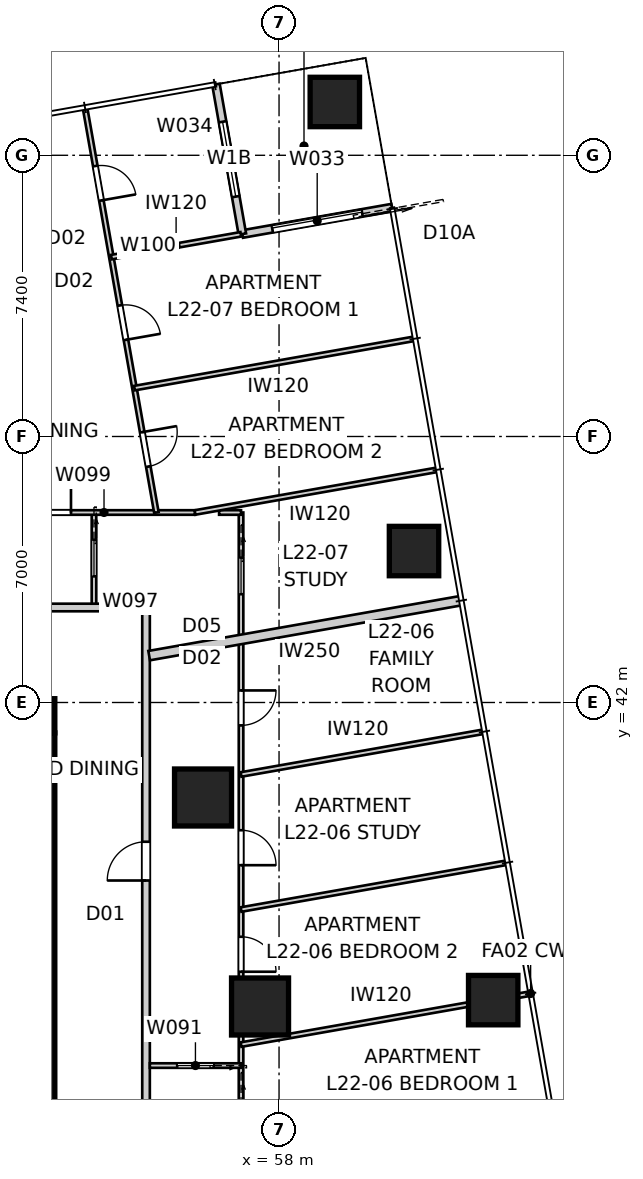
"""IFC4 building model, lengths in metres.
Left out: names, types, materials, properties, quantities, classifications, styles, units other than length and angle.
Written with IfcOpenShell. Run it as: python <this file> out.ifc"""

import sys

from ifc_helpers import new_model, si_unit, direction, frame, frame_2d, origin, origin_2d, place, context, subcontext, project, spatial, polyline, rectangle, outline, extrude, element, fill, save


model = new_model("IFC4")
c1 = context("Model", 3, precision=1e-05, world=origin(), true_north=direction((0.0, 1.0)))
c2 = subcontext(c1, "Body", "Model", "MODEL_VIEW")
j1 = project(units=[si_unit("LENGTHUNIT", "METRE"), si_unit("PLANEANGLEUNIT", "RADIAN")], contexts=[c1])
p1 = place(None, origin())
s1 = spatial("IfcSite", under=j1, at=p1, CompositionType="ELEMENT")
p2 = place(p1, origin())
s2 = spatial("IfcBuilding", under=s1, at=p2, CompositionType="ELEMENT")
p3 = place(p2, frame((0.0, 0.0, 82.8)))
s3 = spatial("IfcBuildingStorey", under=s2, at=p3, CompositionType="ELEMENT", Elevation=82.8)
p4 = place(p3, frame((51.65, 18.8, 0.0), z_axis=(0.0, 0.0, 1.0), x_axis=(0.0, 1.0, 0.0)))
e1 = element("IfcWall", 1, at=p4, inside=s3, PredefinedType="SHEAR", context=c2, shape_type="SweptSolid", body=[
    extrude(outline(polyline([(0.0, -0.45), (22.4, -0.45), (22.4, -0.025), (22.85, -0.025), (22.85, 0.025), (22.4, 0.025), (22.4, 0.45), (0.0, 0.45), (0.0, 0.025), (-0.45, 0.025), (-0.45, -0.025), (0.0, -0.025), (0.0, -0.45)])), origin(), (0.0, 0.0, 1.0), 3.4),
])
p5 = place(p4, frame((11.14, 0.0, 0.0)))
e2 = element("IfcOpeningElement", 2, at=p5, cuts=e1, PredefinedType="OPENING", context=c2, shape_type="SweptSolid", body=[
    extrude(rectangle(XDim=1.02, YDim=2.4, at=frame_2d((0.51, 1.2))), frame((0.0, 0.46, 0.0), z_axis=(0.0, -1.0, 0.0), x_axis=(1.0, 0.0, 0.0)), (0.0, 0.0, 1.0), 0.92),
])
p6 = place(p3, frame((51.65, 41.65, 0.0), z_axis=(0.0, 0.0, 1.0), x_axis=(1.0, 0.0, 0.0)))
e3 = element("IfcColumn", 3, at=p6, inside=s3, PredefinedType="COLUMN", context=c2, shape_type="SweptSolid", body=[
    extrude(rectangle(XDim=0.9, YDim=0.9, at=origin_2d()), origin(), (0.0, 0.0, 1.0), 3.4),
])
for number, where, z_axis, x_axis in (
    (4, (63.635, 34.167, 0.0), (0.0, 0.0, 1.0), (1.0, 0.0, 0.0)),
    (5, (61.552, 45.985, 0.0), (0.0, 0.0, 1.0), (1.0, 0.0, 0.0)),
    (6, (59.468, 57.803, 0.0), (0.0, 0.0, 1.0), (1.0, 0.0, 0.0)),
):
    element("IfcColumn", number, at=place(p3, frame(where, z_axis=z_axis, x_axis=x_axis)), inside=s3, PredefinedType="COLUMN", context=c2, shape_type="SweptSolid", body=[
        extrude(rectangle(XDim=1.3, YDim=1.3, at=origin_2d()), origin(), (0.0, 0.0, 1.0), 3.4),
    ])
for number, where, z_axis, x_axis in (
    (7, (57.5, 34.0, 0.0), (0.0, 0.0, 1.0), (1.0, 0.0, 0.0)),
    (8, (56.0, 39.5, 0.0), (0.0, 0.0, 1.0), (1.0, 0.0, 0.0)),
):
    element("IfcColumn", number, at=place(p3, frame(where, z_axis=z_axis, x_axis=x_axis)), inside=s3, PredefinedType="COLUMN", context=c2, shape_type="SweptSolid", body=[
        extrude(rectangle(XDim=1.5, YDim=1.5, at=origin_2d()), origin(), (0.0, 0.0, 1.0), 3.4),
    ])
p7 = place(p3, frame((60.974, 55.022, 0.0), z_axis=(0.0, 0.0, 1.0), x_axis=(-0.984808127031, -0.173646056486, 0.0)))
e9 = element("IfcWall", 9, at=p7, inside=s3, PredefinedType="SOLIDWALL", context=c2, shape_type="SweptSolid", body=[
    extrude(rectangle(XDim=4.0, YDim=0.2, at=frame_2d((2.0, 0.0))), origin(), (0.0, 0.0, 1.0), 3.25),
])
p8 = place(p7, frame((0.8, 0.0, 0.0)))
e10 = element("IfcOpeningElement", 10, at=p8, cuts=e9, PredefinedType="OPENING", context=c2, shape_type="SweptSolid", body=[
    extrude(rectangle(XDim=2.4, YDim=2.1, at=frame_2d((1.2, 1.05))), frame((0.0, 0.11, 0.0), z_axis=(0.0, -1.0, 0.0), x_axis=(1.0, 0.0, 0.0)), (0.0, 0.0, 1.0), 0.22),
])
p9 = place(p3, frame((57.034, 54.328, 0.0), z_axis=(0.0, 0.0, 1.0), x_axis=(-0.173646056486, 0.984808127031, 0.0)))
e11 = element("IfcWall", 11, at=p9, inside=s3, PredefinedType="SOLIDWALL", context=c2, shape_type="SweptSolid", body=[
    extrude(rectangle(XDim=4.0, YDim=0.2, at=frame_2d((2.0, 0.0))), origin(), (0.0, 0.0, 1.0), 3.25),
])
p10 = place(p9, frame((1.0, 0.0, 0.45)))
e12 = element("IfcOpeningElement", 12, at=p10, cuts=e11, PredefinedType="OPENING", context=c2, shape_type="SweptSolid", body=[
    extrude(rectangle(XDim=2.0, YDim=1.8, at=frame_2d((1.0, 0.9))), frame((0.0, 0.11, 0.0), z_axis=(0.0, -1.0, 0.0), x_axis=(1.0, 0.0, 0.0)), (0.0, 0.0, 1.0), 0.22),
])
p11 = place(p3, frame((54.5, 15.5, 0.0), z_axis=(0.0, 0.0, 1.0), x_axis=(0.0, 1.0, 0.0)))
e13 = element("IfcWall", 13, at=p11, inside=s3, PredefinedType="PARTITIONING", context=c2, shape_type="SweptSolid", body=[
    extrude(rectangle(XDim=29.0, YDim=0.2, at=frame_2d((14.5, 0.0))), origin(), (0.0, 0.0, 1.0), 3.25),
])
p12 = place(p11, frame((21.815, 0.0, 0.0)))
e14 = element("IfcOpeningElement", 14, at=p12, cuts=e13, PredefinedType="OPENING", context=c2, shape_type="SweptSolid", body=[
    extrude(rectangle(XDim=1.02, YDim=2.34, at=frame_2d((0.51, 1.17))), frame((0.0, 0.11, 0.0), z_axis=(0.0, -1.0, 0.0), x_axis=(1.0, 0.0, 0.0)), (0.0, 0.0, 1.0), 0.22),
])
p13 = place(p11, frame((2.855, 0.0, 0.0)))
e15 = element("IfcOpeningElement", 15, at=p13, cuts=e13, PredefinedType="OPENING", context=c2, shape_type="SweptSolid", body=[
    extrude(rectangle(XDim=1.02, YDim=2.1, at=frame_2d((0.51, 1.05))), frame((0.0, 0.11, 0.0), z_axis=(0.0, -1.0, 0.0), x_axis=(1.0, 0.0, 0.0)), (0.0, 0.0, 1.0), 0.22),
])
p14 = place(p3, frame((54.5, 44.5, 0.0), z_axis=(0.0, 0.0, 1.0), x_axis=(-1.0, 0.0, 0.0)))
e16 = element("IfcWall", 16, at=p14, inside=s3, PredefinedType="PARTITIONING", context=c2, shape_type="SweptSolid", body=[
    extrude(rectangle(XDim=29.0, YDim=0.2, at=frame_2d((14.5, 0.0))), origin(), (0.0, 0.0, 1.0), 3.25),
])
p15 = place(p14, frame((10.129, 0.0, 0.0)))
e17 = element("IfcOpeningElement", 17, at=p15, cuts=e16, PredefinedType="OPENING", context=c2, shape_type="SweptSolid", body=[
    extrude(rectangle(XDim=1.02, YDim=2.34, at=frame_2d((0.51, 1.17))), frame((0.0, 0.11, 0.0), z_axis=(0.0, -1.0, 0.0), x_axis=(1.0, 0.0, 0.0)), (0.0, 0.0, 1.0), 0.22),
])
p16 = place(p14, frame((3.065, 0.0, 0.0)))
e18 = element("IfcOpeningElement", 18, at=p16, cuts=e16, PredefinedType="OPENING", context=c2, shape_type="SweptSolid", body=[
    extrude(rectangle(XDim=1.02, YDim=2.1, at=frame_2d((0.51, 1.05))), frame((0.0, 0.11, 0.0), z_axis=(0.0, -1.0, 0.0), x_axis=(1.0, 0.0, 0.0)), (0.0, 0.0, 1.0), 0.22),
])
p17 = place(p3, frame((62.797, 44.682, 0.0), z_axis=(0.0, 0.0, 1.0), x_axis=(-0.984807121942, -0.173651756605, 0.0)))
e19 = element("IfcWall", 19, at=p17, inside=s3, PredefinedType="PARTITIONING", context=c2, shape_type="SweptSolid", body=[
    extrude(rectangle(XDim=8.341, YDim=0.25, at=frame_2d((4.171, 0.0))), origin(), (0.0, 0.0, 1.0), 3.25),
])
p18 = place(p3, frame((57.0, 47.0, 0.0), z_axis=(0.0, 0.0, 1.0), x_axis=(0.0, -1.0, 0.0)))
e20 = element("IfcWall", 20, at=p18, inside=s3, PredefinedType="PARTITIONING", context=c2, shape_type="SweptSolid", body=[
    extrude(rectangle(XDim=34.0, YDim=0.12, at=frame_2d((17.0, 0.0))), origin(), (0.0, 0.0, 1.0), 2.55),
])
p19 = place(p18, frame((8.361, 0.0, 0.0)))
e21 = element("IfcOpeningElement", 21, at=p19, cuts=e20, PredefinedType="OPENING", context=c2, shape_type="SweptSolid", body=[
    extrude(rectangle(XDim=0.92, YDim=2.34, at=frame_2d((0.46, 1.17))), frame((0.0, 0.07, 0.0), z_axis=(0.0, -1.0, 0.0), x_axis=(1.0, 0.0, 0.0)), (0.0, 0.0, 1.0), 0.14),
])
p20 = place(p18, frame((11.166, 0.0, 0.0)))
e22 = element("IfcOpeningElement", 22, at=p20, cuts=e20, PredefinedType="OPENING", context=c2, shape_type="SweptSolid", body=[
    extrude(rectangle(XDim=0.92, YDim=2.34, at=frame_2d((0.46, 1.17))), frame((0.0, 0.07, 0.0), z_axis=(0.0, -1.0, 0.0), x_axis=(1.0, 0.0, 0.0)), (0.0, 0.0, 1.0), 0.14),
])
p21 = place(p18, frame((4.683, 0.0, 0.0)))
e23 = element("IfcOpeningElement", 23, at=p21, cuts=e20, PredefinedType="OPENING", context=c2, shape_type="SweptSolid", body=[
    extrude(rectangle(XDim=0.92, YDim=2.34, at=frame_2d((0.46, 1.17))), frame((0.0, 0.07, 0.0), z_axis=(0.0, -1.0, 0.0), x_axis=(1.0, 0.0, 0.0)), (0.0, 0.0, 1.0), 0.14),
])
p22 = place(p18, frame((27.784, 0.0, 0.0)))
e24 = element("IfcOpeningElement", 24, at=p22, cuts=e20, PredefinedType="OPENING", context=c2, shape_type="SweptSolid", body=[
    extrude(rectangle(XDim=0.92, YDim=2.34, at=frame_2d((0.46, 1.17))), frame((0.0, 0.07, 0.0), z_axis=(0.0, -1.0, 0.0), x_axis=(1.0, 0.0, 0.0)), (0.0, 0.0, 1.0), 0.14),
])
p23 = place(p18, frame((31.939, 0.0, 0.0)))
e25 = element("IfcOpeningElement", 25, at=p23, cuts=e20, PredefinedType="OPENING", context=c2, shape_type="SweptSolid", body=[
    extrude(rectangle(XDim=0.92, YDim=2.34, at=frame_2d((0.46, 1.17))), frame((0.0, 0.07, 0.0), z_axis=(0.0, -1.0, 0.0), x_axis=(1.0, 0.0, 0.0)), (0.0, 0.0, 1.0), 0.14),
])
p24 = place(p18, frame((15.601, 0.0, 0.0)))
e26 = element("IfcOpeningElement", 26, at=p24, cuts=e20, PredefinedType="OPENING", context=c2, shape_type="SweptSolid", body=[
    extrude(rectangle(XDim=0.96, YDim=2.1, at=frame_2d((0.48, 1.05))), frame((0.0, 0.07, 0.0), z_axis=(0.0, -1.0, 0.0), x_axis=(1.0, 0.0, 0.0)), (0.0, 0.0, 1.0), 0.14),
])
p25 = place(p18, frame((18.21, 0.0, 0.0)))
e27 = element("IfcOpeningElement", 27, at=p25, cuts=e20, PredefinedType="OPENING", context=c2, shape_type="SweptSolid", body=[
    extrude(rectangle(XDim=0.96, YDim=2.1, at=frame_2d((0.48, 1.05))), frame((0.0, 0.07, 0.0), z_axis=(0.0, -1.0, 0.0), x_axis=(1.0, 0.0, 0.0)), (0.0, 0.0, 1.0), 0.14),
])
p26 = place(p18, frame((1.19, 0.0, 0.0)))
e28 = element("IfcOpeningElement", 28, at=p26, cuts=e20, PredefinedType="OPENING", context=c2, shape_type="SweptSolid", body=[
    extrude(rectangle(XDim=0.96, YDim=2.1, at=frame_2d((0.48, 1.05))), frame((0.0, 0.07, 0.0), z_axis=(0.0, -1.0, 0.0), x_axis=(1.0, 0.0, 0.0)), (0.0, 0.0, 1.0), 0.14),
])
p27 = place(p3, frame((57.0, 32.446, 0.0), z_axis=(0.0, 0.0, 1.0), x_axis=(-1.0, 0.0, 0.0)))
e29 = element("IfcWall", 29, at=p27, inside=s3, PredefinedType="PARTITIONING", context=c2, shape_type="SweptSolid", body=[
    extrude(rectangle(XDim=2.4, YDim=0.12, at=frame_2d((1.2, 0.0))), origin(), (0.0, 0.0, 1.0), 3.25),
])
p28 = place(p27, frame((0.72, 0.0, 0.0)))
e30 = element("IfcOpeningElement", 30, at=p28, cuts=e29, PredefinedType="OPENING", context=c2, shape_type="SweptSolid", body=[
    extrude(rectangle(XDim=0.96, YDim=2.1, at=frame_2d((0.48, 1.05))), frame((0.0, 0.07, 0.0), z_axis=(0.0, -1.0, 0.0), x_axis=(1.0, 0.0, 0.0)), (0.0, 0.0, 1.0), 0.14),
])
p29 = place(p3, frame((57.0, 32.998, 0.0), z_axis=(0.0, 0.0, 1.0), x_axis=(0.984808453088, 0.173644207293, 0.0)))
e31 = element("IfcWall", 31, at=p29, inside=s3, PredefinedType="PARTITIONING", context=c2, shape_type="SweptSolid", body=[
    extrude(rectangle(XDim=7.698, YDim=0.12, at=frame_2d((3.849, 0.0))), origin(), (0.0, 0.0, 1.0), 3.25),
])
p30 = place(p3, frame((57.0, 36.552, 0.0), z_axis=(0.0, 0.0, 1.0), x_axis=(0.984809234282, 0.173639776761, 0.0)))
e32 = element("IfcWall", 32, at=p30, inside=s3, PredefinedType="PARTITIONING", context=c2, shape_type="SweptSolid", body=[
    extrude(rectangle(XDim=7.081, YDim=0.12, at=frame_2d((3.541, 0.0))), origin(), (0.0, 0.0, 1.0), 3.25),
])
p31 = place(p3, frame((57.0, 40.105, 0.0), z_axis=(0.0, 0.0, 1.0), x_axis=(0.984809025774, 0.173640959323, 0.0)))
e33 = element("IfcWall", 33, at=p31, inside=s3, PredefinedType="PARTITIONING", context=c2, shape_type="SweptSolid", body=[
    extrude(rectangle(XDim=6.463, YDim=0.12, at=frame_2d((3.232, 0.0))), origin(), (0.0, 0.0, 1.0), 3.25),
])
p32 = place(p3, frame((53.13, 47.0, 0.0), z_axis=(0.0, 0.0, 1.0), x_axis=(0.0, -1.0, 0.0)))
e34 = element("IfcWall", 34, at=p32, inside=s3, PredefinedType="PARTITIONING", context=c2, shape_type="SweptSolid", body=[
    extrude(rectangle(XDim=2.4, YDim=0.12, at=frame_2d((1.2, 0.0))), origin(), (0.0, 0.0, 1.0), 3.25),
])
p33 = place(p32, frame((0.72, 0.0, 0.0)))
e35 = element("IfcOpeningElement", 35, at=p33, cuts=e34, PredefinedType="OPENING", context=c2, shape_type="SweptSolid", body=[
    extrude(rectangle(XDim=0.96, YDim=2.1, at=frame_2d((0.48, 1.05))), frame((0.0, 0.07, 0.0), z_axis=(0.0, -1.0, 0.0), x_axis=(1.0, 0.0, 0.0)), (0.0, 0.0, 1.0), 0.14),
])
p34 = place(p3, frame((51.0, 47.0, 0.0), z_axis=(0.0, 0.0, 1.0), x_axis=(1.0, 0.0, 0.0)))
e36 = element("IfcWall", 36, at=p34, inside=s3, PredefinedType="PARTITIONING", context=c2, shape_type="SweptSolid", body=[
    extrude(rectangle(XDim=4.789, YDim=0.12, at=frame_2d((2.395, 0.0))), origin(), (0.0, 0.0, 1.0), 2.638),
])
p35 = place(p34, frame((0.605, 0.0, 0.0)))
e37 = element("IfcOpeningElement", 37, at=p35, cuts=e36, PredefinedType="OPENING", context=c2, shape_type="SweptSolid", body=[
    extrude(rectangle(XDim=0.92, YDim=2.34, at=frame_2d((0.46, 1.17))), frame((0.0, 0.07, 0.0), z_axis=(0.0, -1.0, 0.0), x_axis=(1.0, 0.0, 0.0)), (0.0, 0.0, 1.0), 0.14),
])
p36 = place(p3, frame((52.9, 57.62, 0.0), z_axis=(0.0, 0.0, 1.0), x_axis=(0.173651010046, -0.984807253583, 0.0)))
e38 = element("IfcWall", 38, at=p36, inside=s3, PredefinedType="PARTITIONING", context=c2, shape_type="SweptSolid", body=[
    extrude(rectangle(XDim=10.783, YDim=0.12, at=frame_2d((5.392, 0.0))), origin(), (0.0, 0.0, 1.0), 3.25),
])
p37 = place(p36, frame((1.525, 0.0, 0.0)))
e39 = element("IfcOpeningElement", 39, at=p37, cuts=e38, PredefinedType="OPENING", context=c2, shape_type="SweptSolid", body=[
    extrude(rectangle(XDim=0.92, YDim=2.34, at=frame_2d((0.46, 1.17))), frame((0.0, 0.07, 0.0), z_axis=(0.0, -1.0, 0.0), x_axis=(1.0, 0.0, 0.0)), (0.0, 0.0, 1.0), 0.14),
])
p38 = place(p36, frame((5.25, 0.0, 0.0)))
e40 = element("IfcOpeningElement", 40, at=p38, cuts=e38, PredefinedType="OPENING", context=c2, shape_type="SweptSolid", body=[
    extrude(rectangle(XDim=0.92, YDim=2.34, at=frame_2d((0.46, 1.17))), frame((0.0, 0.07, 0.0), z_axis=(0.0, -1.0, 0.0), x_axis=(1.0, 0.0, 0.0)), (0.0, 0.0, 1.0), 0.14),
])
p39 = place(p36, frame((8.637, 0.0, 0.0)))
e41 = element("IfcOpeningElement", 41, at=p39, cuts=e38, PredefinedType="OPENING", context=c2, shape_type="SweptSolid", body=[
    extrude(rectangle(XDim=0.92, YDim=2.34, at=frame_2d((0.46, 1.17))), frame((0.0, 0.07, 0.0), z_axis=(0.0, -1.0, 0.0), x_axis=(1.0, 0.0, 0.0)), (0.0, 0.0, 1.0), 0.14),
])
p40 = place(p3, frame((61.542, 51.568, 0.0), z_axis=(0.0, 0.0, 1.0), x_axis=(-0.984807929323, -0.173647177755, 0.0)))
e42 = element("IfcWall", 42, at=p40, inside=s3, PredefinedType="PARTITIONING", context=c2, shape_type="SweptSolid", body=[
    extrude(rectangle(XDim=7.46, YDim=0.12, at=frame_2d((3.73, 0.0))), origin(), (0.0, 0.0, 1.0), 3.25),
])
p41 = place(p3, frame((53.588, 53.72, 0.0), z_axis=(0.0, 0.0, 1.0), x_axis=(0.984805572884, 0.173660541335, 0.0)))
e43 = element("IfcWall", 43, at=p41, inside=s3, PredefinedType="PARTITIONING", context=c2, shape_type="SweptSolid", body=[
    extrude(rectangle(XDim=3.46, YDim=0.12, at=frame_2d((1.73, 0.0))), origin(), (0.0, 0.0, 1.0), 3.25),
])
p42 = place(p3, frame((62.15, 48.122, 0.0), z_axis=(0.0, 0.0, 1.0), x_axis=(-0.984806762864, -0.173653792983, 0.0)))
e44 = element("IfcWall", 44, at=p42, inside=s3, PredefinedType="PARTITIONING", context=c2, shape_type="SweptSolid", body=[
    extrude(rectangle(XDim=6.459, YDim=0.12, at=frame_2d((3.229, 0.0))), origin(), (0.0, 0.0, 1.0), 2.638),
])
p43 = place(p3, frame((57.0, 47.0, 0.0), z_axis=(0.0, 0.0, 1.0), x_axis=(-1.0, 0.0, 0.0)))
e45 = element("IfcWall", 45, at=p43, inside=s3, PredefinedType="PARTITIONING", context=c2, shape_type="SweptSolid", body=[
    extrude(rectangle(XDim=0.578, YDim=0.12, at=frame_2d((0.289, 0.0))), origin(), (0.0, 0.0, 1.0), 3.25),
])
p44 = place(p8, origin())
e46 = element("IfcDoor", 46, at=p44, inside=s3, OperationType="SLIDING_TO_LEFT", PredefinedType="DOOR", context=c2, shape_type="SweptSolid", body=[
    extrude(rectangle(XDim=2.4, YDim=2.1, at=frame_2d((1.2, 1.05))), frame((0.0, 0.025, 0.0), z_axis=(0.0, -1.0, 0.0), x_axis=(1.0, 0.0, 0.0)), (0.0, 0.0, 1.0), 0.05),
])
fill(e10, e46)
p45 = place(p10, origin())
e47 = element("IfcWindow", 47, at=p45, inside=s3, PartitioningType="SINGLE_PANEL", PredefinedType="WINDOW", context=c2, shape_type="SweptSolid", body=[
    extrude(rectangle(XDim=2.0, YDim=1.8, at=frame_2d((1.0, 0.9))), frame((0.0, 0.03, 0.0), z_axis=(0.0, -1.0, 0.0), x_axis=(1.0, 0.0, 0.0)), (0.0, 0.0, 1.0), 0.06),
])
fill(e12, e47)
p46 = place(p12, origin())
e48 = element("IfcDoor", 48, at=p46, inside=s3, OperationType="SINGLE_SWING_LEFT", PredefinedType="DOOR", context=c2, shape_type="SweptSolid", body=[
    extrude(rectangle(XDim=1.02, YDim=2.34, at=frame_2d((0.51, 1.17))), frame((0.0, 0.025, 0.0), z_axis=(0.0, -1.0, 0.0), x_axis=(1.0, 0.0, 0.0)), (0.0, 0.0, 1.0), 0.05),
])
fill(e14, e48)
p47 = place(p19, origin())
e49 = element("IfcDoor", 49, at=p47, inside=s3, OperationType="SINGLE_SWING_RIGHT", PredefinedType="DOOR", context=c2, shape_type="SweptSolid", body=[
    extrude(rectangle(XDim=0.92, YDim=2.34, at=frame_2d((0.46, 1.17))), frame((0.0, 0.025, 0.0), z_axis=(0.0, -1.0, 0.0), x_axis=(1.0, 0.0, 0.0)), (0.0, 0.0, 1.0), 0.05),
])
fill(e21, e49)
p48 = place(p20, origin())
e50 = element("IfcDoor", 50, at=p48, inside=s3, OperationType="SINGLE_SWING_RIGHT", PredefinedType="DOOR", context=c2, shape_type="SweptSolid", body=[
    extrude(rectangle(XDim=0.92, YDim=2.34, at=frame_2d((0.46, 1.17))), frame((0.0, 0.025, 0.0), z_axis=(0.0, -1.0, 0.0), x_axis=(1.0, 0.0, 0.0)), (0.0, 0.0, 1.0), 0.05),
])
fill(e22, e50)
p49 = place(p21, origin())
e51 = element("IfcDoor", 51, at=p49, inside=s3, OperationType="SINGLE_SWING_LEFT", PredefinedType="DOOR", context=c2, shape_type="SweptSolid", body=[
    extrude(rectangle(XDim=0.92, YDim=2.34, at=frame_2d((0.46, 1.17))), frame((0.0, 0.025, 0.0), z_axis=(0.0, -1.0, 0.0), x_axis=(1.0, 0.0, 0.0)), (0.0, 0.0, 1.0), 0.05),
])
fill(e23, e51)
p50 = place(p28, origin())
e52 = element("IfcDoor", 52, at=p50, inside=s3, OperationType="SLIDING_TO_LEFT", PredefinedType="DOOR", context=c2, shape_type="SweptSolid", body=[
    extrude(rectangle(XDim=0.96, YDim=2.1, at=frame_2d((0.48, 1.05))), frame((0.0, 0.025, 0.0), z_axis=(0.0, -1.0, 0.0), x_axis=(1.0, 0.0, 0.0)), (0.0, 0.0, 1.0), 0.05),
])
fill(e30, e52)
p51 = place(p33, origin())
e53 = element("IfcDoor", 53, at=p51, inside=s3, OperationType="SLIDING_TO_LEFT", PredefinedType="DOOR", context=c2, shape_type="SweptSolid", body=[
    extrude(rectangle(XDim=0.96, YDim=2.1, at=frame_2d((0.48, 1.05))), frame((0.0, 0.025, 0.0), z_axis=(0.0, -1.0, 0.0), x_axis=(1.0, 0.0, 0.0)), (0.0, 0.0, 1.0), 0.05),
])
fill(e35, e53)
p52 = place(p35, origin())
e54 = element("IfcDoor", 54, at=p52, inside=s3, OperationType="SINGLE_SWING_RIGHT", PredefinedType="DOOR", context=c2, shape_type="SweptSolid", body=[
    extrude(rectangle(XDim=0.92, YDim=2.34, at=frame_2d((0.46, 1.17))), frame((0.0, 0.025, 0.0), z_axis=(0.0, -1.0, 0.0), x_axis=(1.0, 0.0, 0.0)), (0.0, 0.0, 1.0), 0.05),
])
fill(e37, e54)
p53 = place(p26, origin())
e55 = element("IfcDoor", 55, at=p53, inside=s3, OperationType="SLIDING_TO_LEFT", PredefinedType="DOOR", context=c2, shape_type="SweptSolid", body=[
    extrude(rectangle(XDim=0.96, YDim=2.1, at=frame_2d((0.48, 1.05))), frame((0.0, 0.025, 0.0), z_axis=(0.0, -1.0, 0.0), x_axis=(1.0, 0.0, 0.0)), (0.0, 0.0, 1.0), 0.05),
])
fill(e28, e55)
p54 = place(p37, origin())
e56 = element("IfcDoor", 56, at=p54, inside=s3, OperationType="SINGLE_SWING_RIGHT", PredefinedType="DOOR", context=c2, shape_type="SweptSolid", body=[
    extrude(rectangle(XDim=0.92, YDim=2.34, at=frame_2d((0.46, 1.17))), frame((0.0, 0.025, 0.0), z_axis=(0.0, -1.0, 0.0), x_axis=(1.0, 0.0, 0.0)), (0.0, 0.0, 1.0), 0.05),
])
fill(e39, e56)
p55 = place(p38, origin())
e57 = element("IfcDoor", 57, at=p55, inside=s3, OperationType="SINGLE_SWING_RIGHT", PredefinedType="DOOR", context=c2, shape_type="SweptSolid", body=[
    extrude(rectangle(XDim=0.92, YDim=2.34, at=frame_2d((0.46, 1.17))), frame((0.0, 0.025, 0.0), z_axis=(0.0, -1.0, 0.0), x_axis=(1.0, 0.0, 0.0)), (0.0, 0.0, 1.0), 0.05),
])
fill(e40, e57)
p56 = place(p39, origin())
e58 = element("IfcDoor", 58, at=p56, inside=s3, OperationType="SINGLE_SWING_LEFT", PredefinedType="DOOR", context=c2, shape_type="SweptSolid", body=[
    extrude(rectangle(XDim=0.92, YDim=2.34, at=frame_2d((0.46, 1.17))), frame((0.0, 0.025, 0.0), z_axis=(0.0, -1.0, 0.0), x_axis=(1.0, 0.0, 0.0)), (0.0, 0.0, 1.0), 0.05),
])
fill(e41, e58)
save(model, sys.argv[1])
